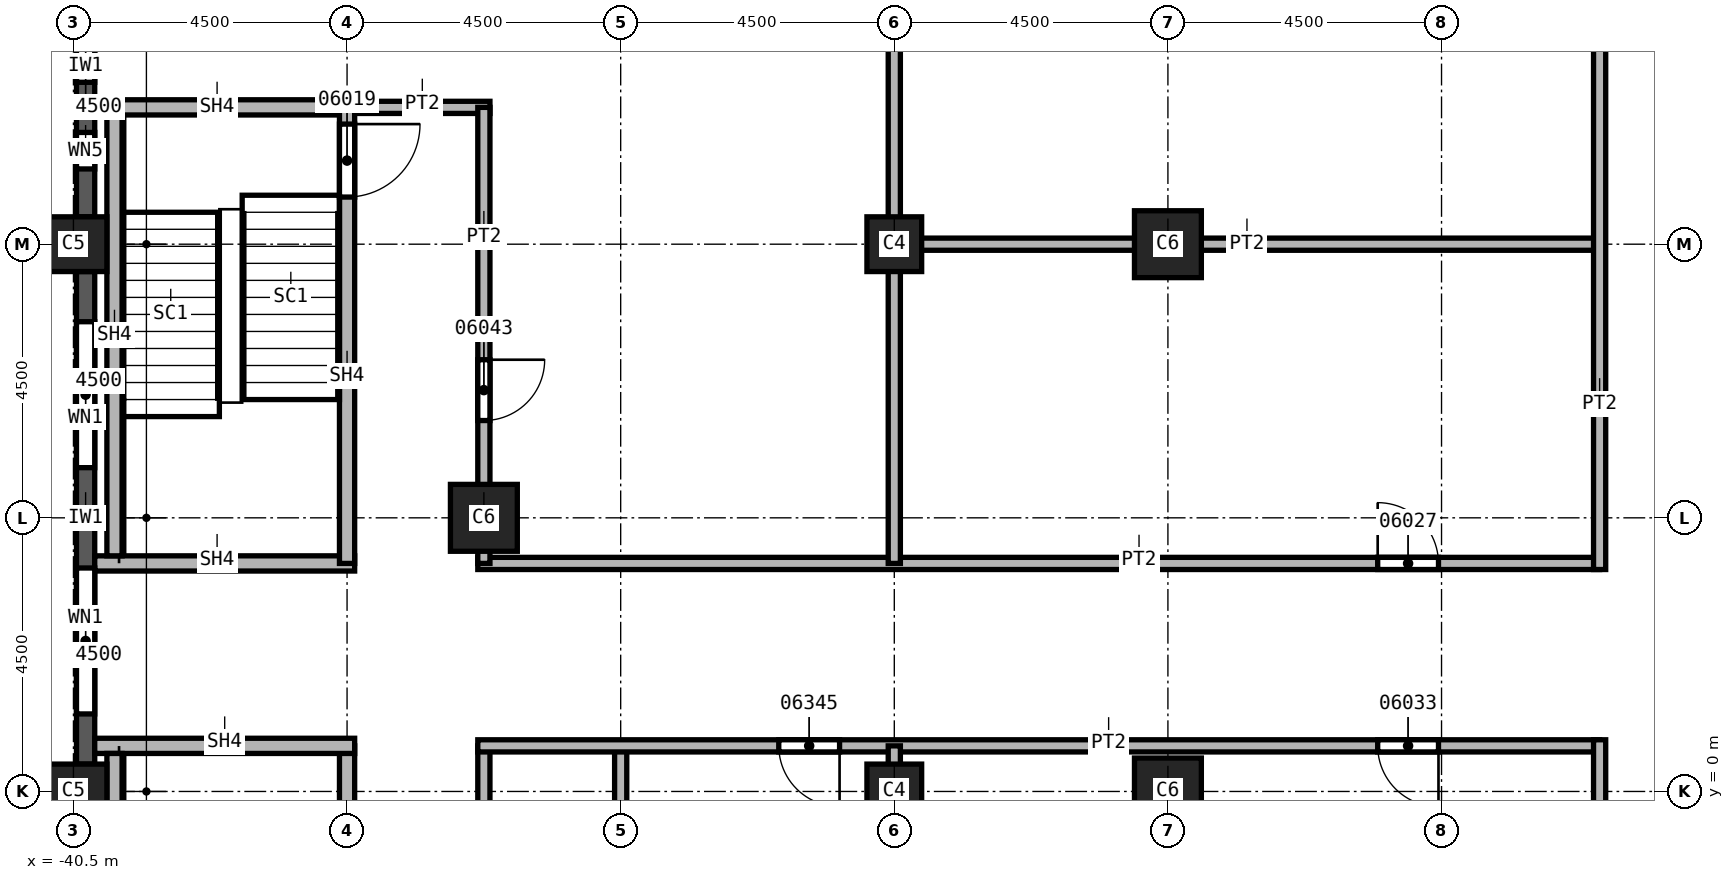
"""IFC4 building model, lengths in metres.
Left out: names, types, materials, properties, quantities, classifications, styles, units other than length and angle.
Written with IfcOpenShell. Run it as: python <this file> out.ifc"""

import sys

from ifc_helpers import new_model, si_unit, direction, frame, frame_2d, origin, origin_2d, place, context, subcontext, project, spatial, rectangle, extrude, element, fill, save


model = new_model("IFC4")
c1 = context("Model", 3, precision=1e-05, world=origin(), true_north=direction((0.0, 1.0)))
c2 = subcontext(c1, "Body", "Model", "MODEL_VIEW")
j1 = project(units=[si_unit("LENGTHUNIT", "METRE"), si_unit("PLANEANGLEUNIT", "RADIAN")], contexts=[c1])
p1 = place(None, origin())
s1 = spatial("IfcSite", under=j1, at=p1, CompositionType="ELEMENT")
p2 = place(p1, origin())
s2 = spatial("IfcBuilding", under=s1, at=p2, CompositionType="ELEMENT")
p3 = place(p2, frame((0.0, 0.0, 130.0)))
s3 = spatial("IfcBuildingStorey", under=s2, at=p3, CompositionType="ELEMENT", Elevation=130.0)
for number, where, z_axis, x_axis in (
    (1, (-40.5, 0.0, 0.0), (0.0, 0.0, 1.0), (0.0, 1.0, 0.0)),
    (2, (-40.5, 9.0, 0.0), (0.0, 0.0, 1.0), (0.0, 1.0, 0.0)),
):
    element("IfcColumn", number, at=place(p3, frame(where, z_axis=z_axis, x_axis=x_axis)), inside=s3, PredefinedType="COLUMN", context=c2, shape_type="SweptSolid", body=[
        extrude(rectangle(XDim=0.9, YDim=1.1, at=origin_2d()), origin(), (0.0, 0.0, 1.0), 3.7),
    ])
for number, where, z_axis, x_axis in (
    (3, (-33.75, 4.5, 0.0), (0.0, 0.0, 1.0), (1.0, 0.0, 0.0)),
    (4, (-22.5, 0.0, 0.0), (0.0, 0.0, 1.0), (1.0, 0.0, 0.0)),
    (5, (-22.5, 9.0, 0.0), (0.0, 0.0, 1.0), (1.0, 0.0, 0.0)),
):
    element("IfcColumn", number, at=place(p3, frame(where, z_axis=z_axis, x_axis=x_axis)), inside=s3, PredefinedType="COLUMN", context=c2, shape_type="SweptSolid", body=[
        extrude(rectangle(XDim=1.1, YDim=1.1, at=origin_2d()), origin(), (0.0, 0.0, 1.0), 3.7),
    ])
for number, where, z_axis, x_axis in (
    (6, (-27.0, 0.0, 0.0), (0.0, 0.0, 1.0), (1.0, 0.0, 0.0)),
    (7, (-27.0, 9.0, 0.0), (0.0, 0.0, 1.0), (1.0, 0.0, 0.0)),
):
    element("IfcColumn", number, at=place(p3, frame(where, z_axis=z_axis, x_axis=x_axis)), inside=s3, PredefinedType="COLUMN", context=c2, shape_type="SweptSolid", body=[
        extrude(rectangle(XDim=0.9, YDim=0.9, at=origin_2d()), origin(), (0.0, 0.0, 1.0), 3.7),
    ])
p4 = place(p3, frame((-40.3, 13.05, 0.0), z_axis=(0.0, 0.0, 1.0), x_axis=(0.0, -1.0, 0.0)))
e8 = element("IfcWall", 8, at=p4, inside=s3, PredefinedType="SOLIDWALL", context=c2, shape_type="SweptSolid", body=[
    extrude(rectangle(XDim=3.6, YDim=0.3, at=frame_2d((1.8, 0.0))), origin(), (0.0, 0.0, 1.0), 3.1),
])
p5 = place(p4, frame((0.788, 0.0, 0.8)))
e9 = element("IfcOpeningElement", 9, at=p5, cuts=e8, PredefinedType="OPENING", context=c2, shape_type="SweptSolid", body=[
    extrude(rectangle(XDim=0.6, YDim=1.95, at=frame_2d((0.3, 0.975))), frame((0.0, 0.15, 0.0), z_axis=(0.0, -1.0, 0.0), x_axis=(1.0, 0.0, 0.0)), (0.0, 0.0, 1.0), 0.3),
])
p6 = place(p4, frame((2.212, 0.0, 0.8)))
e10 = element("IfcOpeningElement", 10, at=p6, cuts=e8, PredefinedType="OPENING", context=c2, shape_type="SweptSolid", body=[
    extrude(rectangle(XDim=0.6, YDim=1.95, at=frame_2d((0.3, 0.975))), frame((0.0, 0.15, 0.0), z_axis=(0.0, -1.0, 0.0), x_axis=(1.0, 0.0, 0.0)), (0.0, 0.0, 1.0), 0.3),
])
p7 = place(p3, frame((-40.3, 8.55, 0.0), z_axis=(0.0, 0.0, 1.0), x_axis=(0.0, -1.0, 0.0)))
e11 = element("IfcWall", 11, at=p7, inside=s3, PredefinedType="SOLIDWALL", context=c2, shape_type="SweptSolid", body=[
    extrude(rectangle(XDim=8.1, YDim=0.3, at=frame_2d((4.05, 0.0))), origin(), (0.0, 0.0, 1.0), 3.1),
])
p8 = place(p7, frame((0.825, 0.0, 0.8)))
e12 = element("IfcOpeningElement", 12, at=p8, cuts=e11, PredefinedType="OPENING", context=c2, shape_type="SweptSolid", body=[
    extrude(rectangle(XDim=2.4, YDim=1.95, at=frame_2d((1.2, 0.975))), frame((0.0, 0.15, 0.0), z_axis=(0.0, -1.0, 0.0), x_axis=(1.0, 0.0, 0.0)), (0.0, 0.0, 1.0), 0.3),
])
p9 = place(p7, frame((4.875, 0.0, 0.8)))
e13 = element("IfcOpeningElement", 13, at=p9, cuts=e11, PredefinedType="OPENING", context=c2, shape_type="SweptSolid", body=[
    extrude(rectangle(XDim=2.4, YDim=1.95, at=frame_2d((1.2, 0.975))), frame((0.0, 0.15, 0.0), z_axis=(0.0, -1.0, 0.0), x_axis=(1.0, 0.0, 0.0)), (0.0, 0.0, 1.0), 0.3),
])
p10 = place(p3, frame((-36.0, 11.25, 0.0), z_axis=(0.0, 0.0, 1.0), x_axis=(1.0, 0.0, 0.0)))
e14 = element("IfcWall", 14, at=p10, inside=s3, PredefinedType="PARTITIONING", context=c2, shape_type="SweptSolid", body=[
    extrude(rectangle(XDim=2.35, YDim=0.2, at=frame_2d((1.175, 0.0))), origin(), (0.0, 0.0, 1.0), 3.7),
])
p11 = place(p3, frame((-33.85, 3.75, 0.0), z_axis=(0.0, 0.0, 1.0), x_axis=(1.0, 0.0, 0.0)))
e15 = element("IfcWall", 15, at=p11, inside=s3, PredefinedType="PARTITIONING", context=c2, shape_type="SweptSolid", body=[
    extrude(rectangle(XDim=18.45, YDim=0.2, at=frame_2d((9.225, 0.0))), origin(), (0.0, 0.0, 1.0), 3.7),
])
p12 = place(p11, frame((14.8, 0.0, 0.0)))
e16 = element("IfcOpeningElement", 16, at=p12, cuts=e15, PredefinedType="OPENING", context=c2, shape_type="SweptSolid", body=[
    extrude(rectangle(XDim=1.0, YDim=2.1, at=frame_2d((0.5, 1.05))), frame((0.0, 0.1, 0.0), z_axis=(0.0, -1.0, 0.0), x_axis=(1.0, 0.0, 0.0)), (0.0, 0.0, 1.0), 0.2),
])
p13 = place(p3, frame((-33.75, 0.75, 0.0), z_axis=(0.0, 0.0, 1.0), x_axis=(0.0, -1.0, 0.0)))
e17 = element("IfcWall", 17, at=p13, inside=s3, PredefinedType="PARTITIONING", context=c2, shape_type="SweptSolid", body=[
    extrude(rectangle(XDim=7.6, YDim=0.2, at=frame_2d((3.8, 0.0))), origin(), (0.0, 0.0, 1.0), 3.7),
])
p14 = place(p13, frame((3.25, 0.0, 0.0)))
e18 = element("IfcOpeningElement", 18, at=p14, cuts=e17, PredefinedType="OPENING", context=c2, shape_type="SweptSolid", body=[
    extrude(rectangle(XDim=1.0, YDim=2.1, at=frame_2d((0.5, 1.05))), frame((0.0, 0.1, 0.0), z_axis=(0.0, -1.0, 0.0), x_axis=(1.0, 0.0, 0.0)), (0.0, 0.0, 1.0), 0.2),
])
p15 = place(p3, frame((-33.75, 11.25, 0.0), z_axis=(0.0, 0.0, 1.0), x_axis=(0.0, -1.0, 0.0)))
e19 = element("IfcWall", 19, at=p15, inside=s3, PredefinedType="PARTITIONING", context=c2, shape_type="SweptSolid", body=[
    extrude(rectangle(XDim=7.5, YDim=0.2, at=frame_2d((3.75, 0.0))), origin(), (0.0, 0.0, 1.0), 3.7),
])
p16 = place(p15, frame((4.15, 0.0, 0.0)))
e20 = element("IfcOpeningElement", 20, at=p16, cuts=e19, PredefinedType="OPENING", context=c2, shape_type="SweptSolid", body=[
    extrude(rectangle(XDim=1.0, YDim=2.1, at=frame_2d((0.5, 1.05))), frame((0.0, 0.1, 0.0), z_axis=(0.0, -1.0, 0.0), x_axis=(1.0, 0.0, 0.0)), (0.0, 0.0, 1.0), 0.2),
])
p17 = place(p3, frame((-31.5, 0.75, 0.0), z_axis=(0.0, 0.0, 1.0), x_axis=(0.0, -1.0, 0.0)))
e21 = element("IfcWall", 21, at=p17, inside=s3, PredefinedType="PARTITIONING", context=c2, shape_type="SweptSolid", body=[
    extrude(rectangle(XDim=18.2, YDim=0.2, at=frame_2d((9.1, 0.0))), origin(), (0.0, 0.0, 1.0), 3.7),
])
p18 = place(p3, frame((-15.4, 0.75, 0.0), z_axis=(0.0, 0.0, 1.0), x_axis=(-1.0, 0.0, 0.0)))
e22 = element("IfcWall", 22, at=p18, inside=s3, PredefinedType="PARTITIONING", context=c2, shape_type="SweptSolid", body=[
    extrude(rectangle(XDim=18.45, YDim=0.2, at=frame_2d((9.225, 0.0))), origin(), (0.0, 0.0, 1.0), 3.7),
])
p19 = place(p18, frame((2.65, 0.0, 0.0)))
e23 = element("IfcOpeningElement", 23, at=p19, cuts=e22, PredefinedType="OPENING", context=c2, shape_type="SweptSolid", body=[
    extrude(rectangle(XDim=1.0, YDim=2.1, at=frame_2d((0.5, 1.05))), frame((0.0, 0.1, 0.0), z_axis=(0.0, -1.0, 0.0), x_axis=(1.0, 0.0, 0.0)), (0.0, 0.0, 1.0), 0.2),
])
p20 = place(p18, frame((12.5, 0.0, 0.0)))
e24 = element("IfcOpeningElement", 24, at=p20, cuts=e22, PredefinedType="OPENING", context=c2, shape_type="SweptSolid", body=[
    extrude(rectangle(XDim=1.0, YDim=2.1, at=frame_2d((0.5, 1.05))), frame((0.0, 0.1, 0.0), z_axis=(0.0, -1.0, 0.0), x_axis=(1.0, 0.0, 0.0)), (0.0, 0.0, 1.0), 0.2),
])
p21 = place(p3, frame((-27.1, 9.0, 0.0), z_axis=(0.0, 0.0, 1.0), x_axis=(1.0, 0.0, 0.0)))
e25 = element("IfcWall", 25, at=p21, inside=s3, PredefinedType="PARTITIONING", context=c2, shape_type="SweptSolid", body=[
    extrude(rectangle(XDim=11.7, YDim=0.2, at=frame_2d((5.85, 0.0))), origin(), (0.0, 0.0, 1.0), 3.7),
])
p22 = place(p3, frame((-27.0, -17.45, 0.0), z_axis=(0.0, 0.0, 1.0), x_axis=(0.0, 1.0, 0.0)))
e26 = element("IfcWall", 26, at=p22, inside=s3, PredefinedType="PARTITIONING", context=c2, shape_type="SweptSolid", body=[
    extrude(rectangle(XDim=18.2, YDim=0.2, at=frame_2d((9.1, 0.0))), origin(), (0.0, 0.0, 1.0), 3.7),
])
p23 = place(p3, frame((-27.0, 3.75, 0.0), z_axis=(0.0, 0.0, 1.0), x_axis=(0.0, 1.0, 0.0)))
e27 = element("IfcWall", 27, at=p23, inside=s3, PredefinedType="PARTITIONING", context=c2, shape_type="SweptSolid", body=[
    extrude(rectangle(XDim=13.7, YDim=0.2, at=frame_2d((6.85, 0.0))), origin(), (0.0, 0.0, 1.0), 3.7),
])
p24 = place(p3, frame((-15.4, -23.25, 0.0), z_axis=(0.0, 0.0, 1.0), x_axis=(0.0, 1.0, 0.0)))
e28 = element("IfcWall", 28, at=p24, inside=s3, PredefinedType="PARTITIONING", context=c2, shape_type="SweptSolid", body=[
    extrude(rectangle(XDim=24.1, YDim=0.2, at=frame_2d((12.05, 0.0))), origin(), (0.0, 0.0, 1.0), 3.7),
])
p25 = place(p24, frame((3.7, 0.0, 0.0)))
e29 = element("IfcOpeningElement", 29, at=p25, cuts=e28, PredefinedType="OPENING", context=c2, shape_type="SweptSolid", body=[
    extrude(rectangle(XDim=1.0, YDim=2.1, at=frame_2d((0.5, 1.05))), frame((0.0, 0.1, 0.0), z_axis=(0.0, -1.0, 0.0), x_axis=(1.0, 0.0, 0.0)), (0.0, 0.0, 1.0), 0.2),
])
p26 = place(p24, frame((10.9, 0.0, 0.0)))
e30 = element("IfcOpeningElement", 30, at=p26, cuts=e28, PredefinedType="OPENING", context=c2, shape_type="SweptSolid", body=[
    extrude(rectangle(XDim=1.0, YDim=2.1, at=frame_2d((0.5, 1.05))), frame((0.0, 0.1, 0.0), z_axis=(0.0, -1.0, 0.0), x_axis=(1.0, 0.0, 0.0)), (0.0, 0.0, 1.0), 0.2),
])
p27 = place(p24, frame((16.65, 0.0, 0.0)))
e31 = element("IfcOpeningElement", 31, at=p27, cuts=e28, PredefinedType="OPENING", context=c2, shape_type="SweptSolid", body=[
    extrude(rectangle(XDim=1.0, YDim=2.1, at=frame_2d((0.5, 1.05))), frame((0.0, 0.1, 0.0), z_axis=(0.0, -1.0, 0.0), x_axis=(1.0, 0.0, 0.0)), (0.0, 0.0, 1.0), 0.2),
])
p28 = place(p3, frame((-15.4, 3.65, 0.0), z_axis=(0.0, 0.0, 1.0), x_axis=(0.0, 1.0, 0.0)))
e32 = element("IfcWall", 32, at=p28, inside=s3, PredefinedType="PARTITIONING", context=c2, shape_type="SweptSolid", body=[
    extrude(rectangle(XDim=9.95, YDim=0.2, at=frame_2d((4.975, 0.0))), origin(), (0.0, 0.0, 1.0), 3.7),
])
p29 = place(p3, frame((-40.15, 3.75, 0.0), z_axis=(0.0, 0.0, 1.0), x_axis=(1.0, 0.0, 0.0)))
e33 = element("IfcWall", 33, at=p29, inside=s3, PredefinedType="SOLIDWALL", context=c2, shape_type="SweptSolid", body=[
    extrude(rectangle(XDim=4.275, YDim=0.25, at=frame_2d((2.137, 0.0))), origin(), (0.0, 0.0, 1.0), 3.7),
])
p30 = place(p3, frame((-40.15, 11.25, 0.0), z_axis=(0.0, 0.0, 1.0), x_axis=(1.0, 0.0, 0.0)))
e34 = element("IfcWall", 34, at=p30, inside=s3, PredefinedType="SOLIDWALL", context=c2, shape_type="SweptSolid", body=[
    extrude(rectangle(XDim=4.15, YDim=0.25, at=frame_2d((2.075, 0.0))), origin(), (0.0, 0.0, 1.0), 3.7),
])
p31 = place(p3, frame((-36.0, 0.75, 0.0), z_axis=(0.0, 0.0, 1.0), x_axis=(0.0, -1.0, 0.0)))
e35 = element("IfcWall", 35, at=p31, inside=s3, PredefinedType="SOLIDWALL", context=c2, shape_type="SweptSolid", body=[
    extrude(rectangle(XDim=7.625, YDim=0.25, at=frame_2d((3.812, 0.0))), origin(), (0.0, 0.0, 1.0), 3.7),
])
p32 = place(p31, frame((5.95, 0.0, 0.0)))
e36 = element("IfcOpeningElement", 36, at=p32, cuts=e35, PredefinedType="OPENING", context=c2, shape_type="SweptSolid", body=[
    extrude(rectangle(XDim=1.2, YDim=2.1, at=frame_2d((0.6, 1.05))), frame((0.0, 0.125, 0.0), z_axis=(0.0, -1.0, 0.0), x_axis=(1.0, 0.0, 0.0)), (0.0, 0.0, 1.0), 0.25),
])
p33 = place(p3, frame((-36.0, 11.375, 0.0), z_axis=(0.0, 0.0, 1.0), x_axis=(0.0, -1.0, 0.0)))
e37 = element("IfcWall", 37, at=p33, inside=s3, PredefinedType="SOLIDWALL", context=c2, shape_type="SweptSolid", body=[
    extrude(rectangle(XDim=7.625, YDim=0.25, at=frame_2d((3.812, 0.0))), origin(), (0.0, 0.0, 1.0), 3.7),
])
p34 = place(p33, frame((0.4, 0.0, 0.0)))
e38 = element("IfcOpeningElement", 38, at=p34, cuts=e37, PredefinedType="OPENING", context=c2, shape_type="SweptSolid", body=[
    extrude(rectangle(XDim=1.2, YDim=2.1, at=frame_2d((0.6, 1.05))), frame((0.0, 0.125, 0.0), z_axis=(0.0, -1.0, 0.0), x_axis=(1.0, 0.0, 0.0)), (0.0, 0.0, 1.0), 0.25),
])
p35 = place(p3, frame((-35.875, 0.75, 0.0), z_axis=(0.0, 0.0, 1.0), x_axis=(-1.0, 0.0, 0.0)))
e39 = element("IfcWall", 39, at=p35, inside=s3, PredefinedType="SOLIDWALL", context=c2, shape_type="SweptSolid", body=[
    extrude(rectangle(XDim=4.275, YDim=0.25, at=frame_2d((2.137, 0.0))), origin(), (0.0, 0.0, 1.0), 3.7),
])
for number, where, z_axis, x_axis in (
    (40, (-39.825, 3.875, 0.0), (0.0, 0.0, 1.0), (0.0, 1.0, 0.0)),
    (41, (-39.825, -6.625, 0.0), (0.0, 0.0, 1.0), (0.0, 1.0, 0.0)),
):
    element("IfcWall", number, at=place(p3, frame(where, z_axis=z_axis, x_axis=x_axis)), inside=s3, PredefinedType="SOLIDWALL", context=c2, shape_type="SweptSolid", body=[
        extrude(rectangle(XDim=7.25, YDim=0.25, at=frame_2d((3.625, 0.0))), origin(), (0.0, 0.0, 1.0), 3.7),
    ])
p36 = place(p8, origin())
e42 = element("IfcWindow", 42, at=p36, inside=s3, PartitioningType="SINGLE_PANEL", PredefinedType="WINDOW", context=c2, shape_type="SweptSolid", body=[
    extrude(rectangle(XDim=2.4, YDim=1.95, at=frame_2d((1.2, 0.975))), frame((0.0, 0.03, 0.0), z_axis=(0.0, -1.0, 0.0), x_axis=(1.0, 0.0, 0.0)), (0.0, 0.0, 1.0), 0.06),
])
fill(e12, e42)
p37 = place(p9, origin())
e43 = element("IfcWindow", 43, at=p37, inside=s3, PartitioningType="SINGLE_PANEL", PredefinedType="WINDOW", context=c2, shape_type="SweptSolid", body=[
    extrude(rectangle(XDim=2.4, YDim=1.95, at=frame_2d((1.2, 0.975))), frame((0.0, 0.03, 0.0), z_axis=(0.0, -1.0, 0.0), x_axis=(1.0, 0.0, 0.0)), (0.0, 0.0, 1.0), 0.06),
])
fill(e13, e43)
p38 = place(p34, origin())
e44 = element("IfcDoor", 44, at=p38, inside=s3, OperationType="SINGLE_SWING_RIGHT", PredefinedType="DOOR", context=c2, shape_type="SweptSolid", body=[
    extrude(rectangle(XDim=1.2, YDim=2.1, at=frame_2d((0.6, 1.05))), frame((0.0, 0.025, 0.0), z_axis=(0.0, -1.0, 0.0), x_axis=(1.0, 0.0, 0.0)), (0.0, 0.0, 1.0), 0.05),
])
fill(e38, e44)
p39 = place(p12, origin())
e45 = element("IfcDoor", 45, at=p39, inside=s3, OperationType="SINGLE_SWING_RIGHT", PredefinedType="DOOR", context=c2, shape_type="SweptSolid", body=[
    extrude(rectangle(XDim=1.0, YDim=2.1, at=frame_2d((0.5, 1.05))), frame((0.0, 0.025, 0.0), z_axis=(0.0, -1.0, 0.0), x_axis=(1.0, 0.0, 0.0)), (0.0, 0.0, 1.0), 0.05),
])
fill(e16, e45)
p40 = place(p19, origin())
e46 = element("IfcDoor", 46, at=p40, inside=s3, OperationType="SINGLE_SWING_RIGHT", PredefinedType="DOOR", context=c2, shape_type="SweptSolid", body=[
    extrude(rectangle(XDim=1.0, YDim=2.1, at=frame_2d((0.5, 1.05))), frame((0.0, 0.025, 0.0), z_axis=(0.0, -1.0, 0.0), x_axis=(1.0, 0.0, 0.0)), (0.0, 0.0, 1.0), 0.05),
])
fill(e23, e46)
p41 = place(p16, origin())
e47 = element("IfcDoor", 47, at=p41, inside=s3, OperationType="SINGLE_SWING_RIGHT", PredefinedType="DOOR", context=c2, shape_type="SweptSolid", body=[
    extrude(rectangle(XDim=1.0, YDim=2.1, at=frame_2d((0.5, 1.05))), frame((0.0, 0.025, 0.0), z_axis=(0.0, -1.0, 0.0), x_axis=(1.0, 0.0, 0.0)), (0.0, 0.0, 1.0), 0.05),
])
fill(e20, e47)
p42 = place(p20, origin())
e48 = element("IfcDoor", 48, at=p42, inside=s3, OperationType="SINGLE_SWING_RIGHT", PredefinedType="DOOR", context=c2, shape_type="SweptSolid", body=[
    extrude(rectangle(XDim=1.0, YDim=2.1, at=frame_2d((0.5, 1.05))), frame((0.0, 0.025, 0.0), z_axis=(0.0, -1.0, 0.0), x_axis=(1.0, 0.0, 0.0)), (0.0, 0.0, 1.0), 0.05),
])
fill(e24, e48)
p43 = place(p5, origin())
e49 = element("IfcWindow", 49, at=p43, inside=s3, PartitioningType="SINGLE_PANEL", PredefinedType="WINDOW", context=c2, shape_type="SweptSolid", body=[
    extrude(rectangle(XDim=0.6, YDim=1.95, at=frame_2d((0.3, 0.975))), frame((0.0, 0.03, 0.0), z_axis=(0.0, -1.0, 0.0), x_axis=(1.0, 0.0, 0.0)), (0.0, 0.0, 1.0), 0.06),
])
fill(e9, e49)
p44 = place(p6, origin())
e50 = element("IfcWindow", 50, at=p44, inside=s3, PartitioningType="SINGLE_PANEL", PredefinedType="WINDOW", context=c2, shape_type="SweptSolid", body=[
    extrude(rectangle(XDim=0.6, YDim=1.95, at=frame_2d((0.3, 0.975))), frame((0.0, 0.03, 0.0), z_axis=(0.0, -1.0, 0.0), x_axis=(1.0, 0.0, 0.0)), (0.0, 0.0, 1.0), 0.06),
])
fill(e10, e50)
save(model, sys.argv[1])
